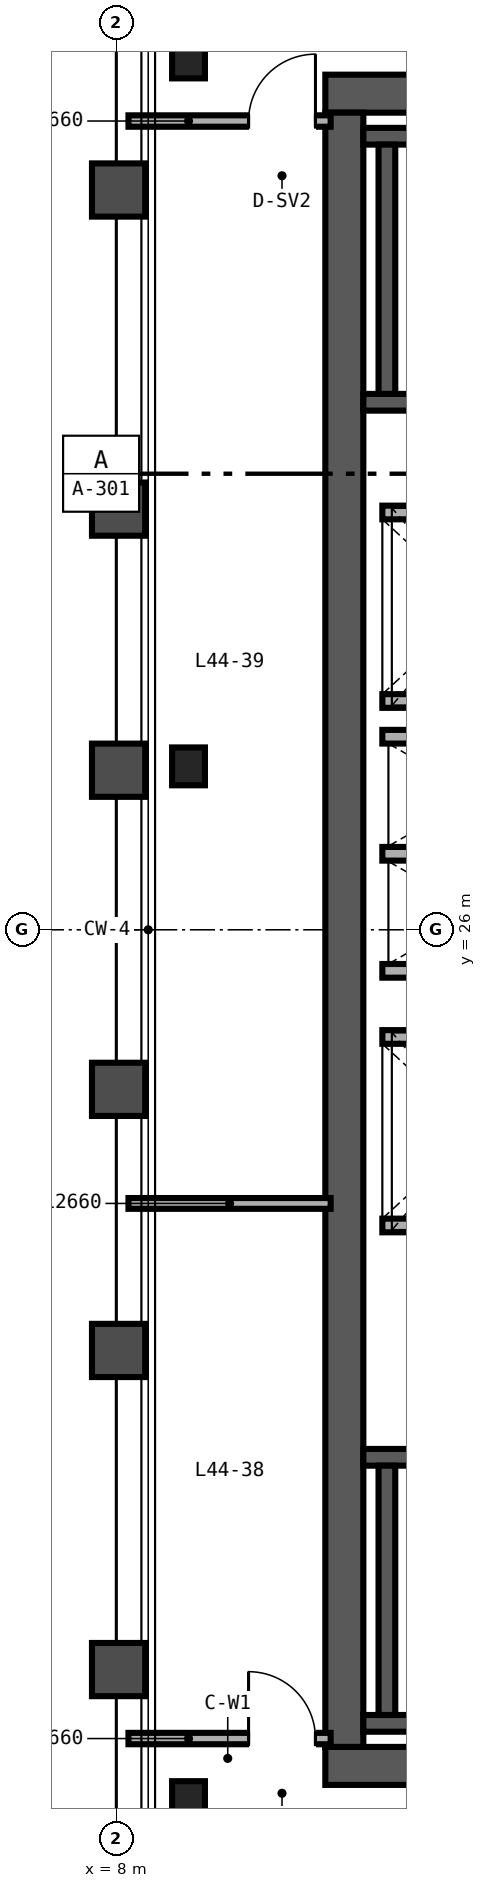
"""IFC4 building model, lengths in metres.
Left out: names, types, materials, properties, quantities, classifications, styles, units other than length and angle.
Written with IfcOpenShell. Run it as: python <this file> out.ifc"""

import sys

from ifc_helpers import new_model, si_unit, direction, frame, frame_2d, origin, origin_2d, place, context, subcontext, project, spatial, rectangle, i_section, extrude, source, transform, mapped, element, fill, save


model = new_model("IFC4")
c1 = context("Model", 3, precision=1e-05, world=origin(), true_north=direction((0.0, 1.0)))
c2 = subcontext(c1, "Body", "Model", "MODEL_VIEW")
j1 = project(units=[si_unit("LENGTHUNIT", "METRE"), si_unit("PLANEANGLEUNIT", "RADIAN")], contexts=[c1])
p1 = place(None, origin())
s1 = spatial("IfcSite", under=j1, at=p1, CompositionType="ELEMENT")
p2 = place(p1, origin())
s2 = spatial("IfcBuilding", under=s1, at=p2, CompositionType="ELEMENT")
p3 = place(p2, frame((0.0, 0.0, 177.6)))
s3 = spatial("IfcBuildingStorey", under=s2, at=p3, CompositionType="ELEMENT", Elevation=177.6)
p4 = place(p3, frame((10.75, 15.0, 0.0), z_axis=(0.0, 0.0, 1.0), x_axis=(1.0, 0.0, 0.0)))
e1 = element("IfcWall", 1, at=p4, inside=s3, PredefinedType="SHEAR", context=c2, shape_type="SweptSolid", body=[
    extrude(rectangle(XDim=12.5, YDim=0.5, at=frame_2d((6.25, 0.0))), origin(), (0.0, 0.0, 1.0), 3.37),
])
p5 = place(p4, frame((10.15, 0.0, 0.0)))
e2 = element("IfcOpeningElement", 2, at=p5, cuts=e1, PredefinedType="OPENING", context=c2, shape_type="SweptSolid", body=[
    extrude(rectangle(XDim=1.0, YDim=2.15, at=frame_2d((0.5, 1.075))), frame((0.0, 0.26, 0.0), z_axis=(0.0, -1.0, 0.0), x_axis=(1.0, 0.0, 0.0)), (0.0, 0.0, 1.0), 0.52),
])
p6 = place(p3, frame((10.75, 37.0, 0.0), z_axis=(0.0, 0.0, 1.0), x_axis=(1.0, 0.0, 0.0)))
e3 = element("IfcWall", 3, at=p6, inside=s3, PredefinedType="SHEAR", context=c2, shape_type="SweptSolid", body=[
    extrude(rectangle(XDim=12.5, YDim=0.5, at=frame_2d((6.25, 0.0))), origin(), (0.0, 0.0, 1.0), 3.37),
])
p7 = place(p6, frame((10.35, 0.0, 0.0)))
e4 = element("IfcOpeningElement", 4, at=p7, cuts=e3, PredefinedType="OPENING", context=c2, shape_type="SweptSolid", body=[
    extrude(rectangle(XDim=1.0, YDim=2.15, at=frame_2d((0.5, 1.075))), frame((0.0, 0.26, 0.0), z_axis=(0.0, -1.0, 0.0), x_axis=(1.0, 0.0, 0.0)), (0.0, 0.0, 1.0), 0.52),
])
p8 = place(p3, frame((11.0, 15.25, 0.0), z_axis=(0.0, 0.0, 1.0), x_axis=(0.0, 1.0, 0.0)))
e5 = element("IfcWall", 5, at=p8, inside=s3, PredefinedType="SHEAR", context=c2, shape_type="SweptSolid", body=[
    extrude(rectangle(XDim=21.5, YDim=0.5, at=frame_2d((10.75, 0.0))), origin(), (0.0, 0.0, 1.0), 3.37),
])
p9 = place(p3, frame((11.25, 15.56, 0.0), z_axis=(0.0, 0.0, 1.0), x_axis=(1.0, 0.0, 0.0)))
e6 = element("IfcWall", 6, at=p9, inside=s3, PredefinedType="SHEAR", context=c2, shape_type="SweptSolid", body=[
    extrude(rectangle(XDim=8.06, YDim=0.22, at=frame_2d((4.03, 0.0))), origin(), (0.0, 0.0, 1.0), 3.4),
])
p10 = place(p3, frame((11.25, 19.06, 0.0), z_axis=(0.0, 0.0, 1.0), x_axis=(1.0, 0.0, 0.0)))
e7 = element("IfcWall", 7, at=p10, inside=s3, PredefinedType="SHEAR", context=c2, shape_type="SweptSolid", body=[
    extrude(rectangle(XDim=8.06, YDim=0.22, at=frame_2d((4.03, 0.0))), origin(), (0.0, 0.0, 1.0), 3.4),
])
p11 = place(p10, frame((0.67, 0.0, 0.0)))
e8 = element("IfcOpeningElement", 8, at=p11, cuts=e7, PredefinedType="OPENING", context=c2, shape_type="SweptSolid", body=[
    extrude(rectangle(XDim=1.05, YDim=2.15, at=frame_2d((0.525, 1.075))), frame((0.0, 0.12, 0.0), z_axis=(0.0, -1.0, 0.0), x_axis=(1.0, 0.0, 0.0)), (0.0, 0.0, 1.0), 0.24),
])
p12 = place(p3, frame((11.56, 15.67, 0.0), z_axis=(0.0, 0.0, 1.0), x_axis=(0.0, 1.0, 0.0)))
e9 = element("IfcWall", 9, at=p12, inside=s3, PredefinedType="SHEAR", context=c2, shape_type="SweptSolid", body=[
    extrude(rectangle(XDim=3.28, YDim=0.22, at=frame_2d((1.64, 0.0))), origin(), (0.0, 0.0, 1.0), 3.4),
])
p13 = place(p3, frame((11.25, 32.94, 0.0), z_axis=(0.0, 0.0, 1.0), x_axis=(1.0, 0.0, 0.0)))
e10 = element("IfcWall", 10, at=p13, inside=s3, PredefinedType="SHEAR", context=c2, shape_type="SweptSolid", body=[
    extrude(rectangle(XDim=8.06, YDim=0.22, at=frame_2d((4.03, 0.0))), origin(), (0.0, 0.0, 1.0), 3.4),
])
p14 = place(p13, frame((0.67, 0.0, 0.0)))
e11 = element("IfcOpeningElement", 11, at=p14, cuts=e10, PredefinedType="OPENING", context=c2, shape_type="SweptSolid", body=[
    extrude(rectangle(XDim=1.05, YDim=2.15, at=frame_2d((0.525, 1.075))), frame((0.0, 0.12, 0.0), z_axis=(0.0, -1.0, 0.0), x_axis=(1.0, 0.0, 0.0)), (0.0, 0.0, 1.0), 0.24),
])
p15 = place(p3, frame((11.25, 36.44, 0.0), z_axis=(0.0, 0.0, 1.0), x_axis=(1.0, 0.0, 0.0)))
e12 = element("IfcWall", 12, at=p15, inside=s3, PredefinedType="SHEAR", context=c2, shape_type="SweptSolid", body=[
    extrude(rectangle(XDim=8.06, YDim=0.22, at=frame_2d((4.03, 0.0))), origin(), (0.0, 0.0, 1.0), 3.4),
])
p16 = place(p3, frame((11.56, 33.05, 0.0), z_axis=(0.0, 0.0, 1.0), x_axis=(0.0, 1.0, 0.0)))
e13 = element("IfcWall", 13, at=p16, inside=s3, PredefinedType="SHEAR", context=c2, shape_type="SweptSolid", body=[
    extrude(rectangle(XDim=3.28, YDim=0.22, at=frame_2d((1.64, 0.0))), origin(), (0.0, 0.0, 1.0), 3.4),
])
m1 = source(origin(), c2, "Body", "SweptSolid", [
    extrude(i_section(OverallWidth=0.432, OverallDepth=0.498, WebThickness=0.056, FlangeThickness=0.089, FilletRadius=0.025, at=origin_2d()), origin(), (0.0, 0.0, 1.0), 3.37),
])
for number, where, z_axis, x_axis in (
    (14, (8.95, 14.55, 0.0), (0.0, 0.0, 1.0), (1.0, 0.0, 0.0)),
    (15, (8.95, 28.15, 0.0), (0.0, 0.0, 1.0), (1.0, 0.0, 0.0)),
    (16, (8.95, 37.45, 0.0), (0.0, 0.0, 1.0), (1.0, 0.0, 0.0)),
):
    element("IfcColumn", number, at=place(p3, frame(where, z_axis=z_axis, x_axis=x_axis)), inside=s3, PredefinedType="COLUMN", context=c2, shape_type="MappedRepresentation", body=[
        mapped(m1, transform((0.0, 0.0, 0.0), scale=1.0)),
    ])
for number, where, z_axis, x_axis in (
    (17, (11.5, 22.11, 0.0), (0.0, 0.0, 1.0), (1.0, 0.0, 0.0)),
    (18, (11.5, 24.59, 0.0), (0.0, 0.0, 1.0), (1.0, 0.0, 0.0)),
    (19, (11.5, 29.01, 0.0), (0.0, 0.0, 1.0), (1.0, 0.0, 0.0)),
    (20, (11.5, 31.49, 0.0), (0.0, 0.0, 1.0), (1.0, 0.0, 0.0)),
):
    element("IfcWall", number, at=place(p3, frame(where, z_axis=z_axis, x_axis=x_axis)), inside=s3, PredefinedType="SOLIDWALL", context=c2, shape_type="SweptSolid", body=[
        extrude(rectangle(XDim=2.5, YDim=0.18, at=frame_2d((1.25, 0.0))), origin(), (0.0, 0.0, 1.0), 3.37),
    ])
for number, where, z_axis, x_axis in (
    (21, (11.5, 25.46, 0.0), (0.0, 0.0, 1.0), (1.0, 0.0, 0.0)),
    (22, (11.5, 27.0, 0.0), (0.0, 0.0, 1.0), (1.0, 0.0, 0.0)),
    (23, (11.5, 28.54, 0.0), (0.0, 0.0, 1.0), (1.0, 0.0, 0.0)),
):
    element("IfcWall", number, at=place(p3, frame(where, z_axis=z_axis, x_axis=x_axis)), inside=s3, PredefinedType="SOLIDWALL", context=c2, shape_type="SweptSolid", body=[
        extrude(rectangle(XDim=2.51, YDim=0.18, at=frame_2d((1.255, 0.0))), origin(), (0.0, 0.0, 1.0), 3.37),
    ])
p17 = place(p3, frame((8.16, 15.36, 0.0), z_axis=(0.0, 0.0, 1.0), x_axis=(1.0, 0.0, 0.0)))
e24 = element("IfcWall", 24, at=p17, inside=s3, PredefinedType="PARTITIONING", context=c2, shape_type="SweptSolid", body=[
    extrude(rectangle(XDim=2.66, YDim=0.15, at=frame_2d((1.33, 0.0))), origin(), (0.0, 0.0, 1.0), 2.591),
])
p18 = place(p17, frame((1.58, 0.0, 0.0)))
e25 = element("IfcOpeningElement", 25, at=p18, cuts=e24, PredefinedType="OPENING", context=c2, shape_type="SweptSolid", body=[
    extrude(rectangle(XDim=0.88, YDim=2.15, at=frame_2d((0.44, 1.075))), frame((0.0, 0.085, 0.0), z_axis=(0.0, -1.0, 0.0), x_axis=(1.0, 0.0, 0.0)), (0.0, 0.0, 1.0), 0.17),
])
p19 = place(p3, frame((8.16, 36.64, 0.0), z_axis=(0.0, 0.0, 1.0), x_axis=(1.0, 0.0, 0.0)))
e26 = element("IfcWall", 26, at=p19, inside=s3, PredefinedType="PARTITIONING", context=c2, shape_type="SweptSolid", body=[
    extrude(rectangle(XDim=2.66, YDim=0.15, at=frame_2d((1.33, 0.0))), origin(), (0.0, 0.0, 1.0), 2.753),
])
p20 = place(p19, frame((1.58, 0.0, 0.0)))
e27 = element("IfcOpeningElement", 27, at=p20, cuts=e26, PredefinedType="OPENING", context=c2, shape_type="SweptSolid", body=[
    extrude(rectangle(XDim=0.88, YDim=2.15, at=frame_2d((0.44, 1.075))), frame((0.0, 0.085, 0.0), z_axis=(0.0, -1.0, 0.0), x_axis=(1.0, 0.0, 0.0)), (0.0, 0.0, 1.0), 0.17),
])
p21 = place(p3, frame((8.16, 22.4, 0.0), z_axis=(0.0, 0.0, 1.0), x_axis=(1.0, 0.0, 0.0)))
e28 = element("IfcWall", 28, at=p21, inside=s3, PredefinedType="PARTITIONING", context=c2, shape_type="SweptSolid", body=[
    extrude(rectangle(XDim=2.66, YDim=0.142, at=frame_2d((1.33, 0.0))), origin(), (0.0, 0.0, 1.0), 2.591),
])
m2 = source(origin(), c2, "Body", "SweptSolid", [
    extrude(rectangle(XDim=0.88, YDim=2.15, at=frame_2d((0.44, 1.075))), frame((0.0, 0.025, 0.0), z_axis=(0.0, -1.0, 0.0), x_axis=(1.0, 0.0, 0.0)), (0.0, 0.0, 1.0), 0.05),
])
p22 = place(p18, origin())
e29 = element("IfcDoor", 29, at=p22, inside=s3, OperationType="SINGLE_SWING_LEFT", PredefinedType="DOOR", context=c2, shape_type="MappedRepresentation", body=[
    mapped(m2, transform((0.0, 0.0, 0.0), scale=1.0)),
])
fill(e25, e29)
p23 = place(p20, origin())
e30 = element("IfcDoor", 30, at=p23, inside=s3, OperationType="SINGLE_SWING_RIGHT", PredefinedType="DOOR", context=c2, shape_type="MappedRepresentation", body=[
    mapped(m2, transform((0.0, 0.0, 0.0), scale=1.0)),
])
fill(e27, e30)
save(model, sys.argv[1])
